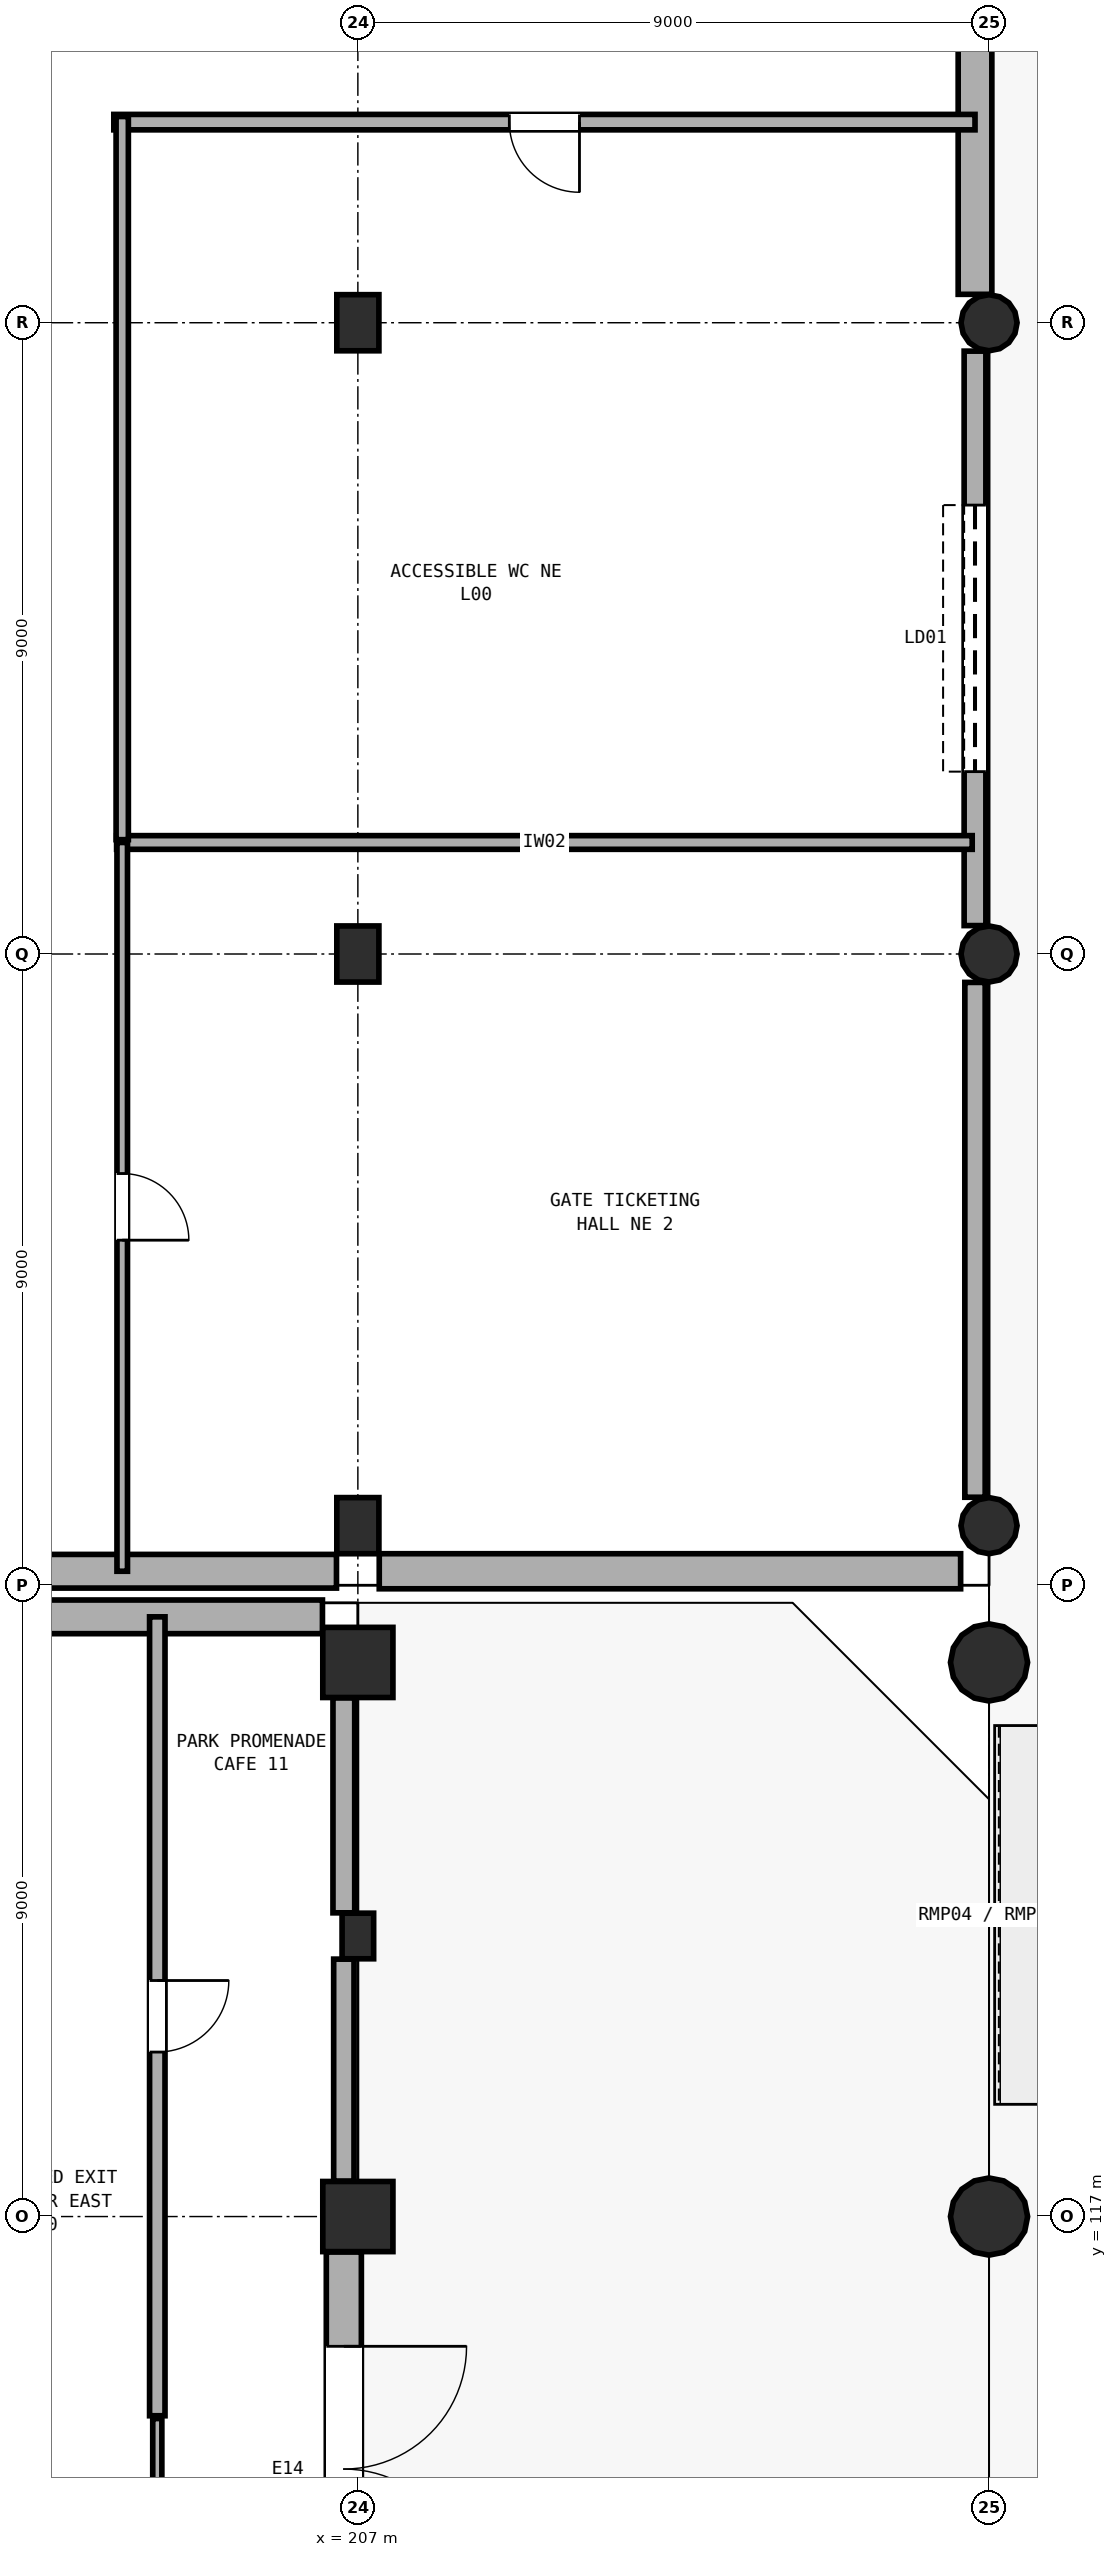
"""IFC4 building model, lengths in metres.
Left out: names, types, materials, properties, quantities, classifications, styles, units other than length and angle.
Written with IfcOpenShell. Run it as: python <this file> out.ifc"""

import sys

from ifc_helpers import new_model, si_unit, direction, frame, frame_2d, origin, origin_2d, place, context, subcontext, project, spatial, rectangle, circle, extrude, element, fill, save


model = new_model("IFC4")
c1 = context("Model", 3, precision=1e-05, world=origin(), true_north=direction((0.0, 1.0)))
c2 = subcontext(c1, "Body", "Model", "MODEL_VIEW")
j1 = project(units=[si_unit("LENGTHUNIT", "METRE"), si_unit("PLANEANGLEUNIT", "RADIAN")], contexts=[c1])
p1 = place(None, origin())
s1 = spatial("IfcSite", under=j1, at=p1, CompositionType="ELEMENT")
p2 = place(p1, origin())
s2 = spatial("IfcBuilding", under=s1, at=p2, CompositionType="ELEMENT")
p3 = place(p2, origin())
s3 = spatial("IfcBuildingStorey", under=s2, at=p3, CompositionType="ELEMENT", Elevation=0.0)
for number, where, z_axis, x_axis in (
    (1, (207.0, 117.0, 0.0), (0.0, 0.0, 1.0), (1.0, 0.0, 0.0)),
    (2, (207.0, 124.9, 0.0), (0.0, 0.0, 1.0), (1.0, 0.0, 0.0)),
):
    element("IfcColumn", number, at=place(p3, frame(where, z_axis=z_axis, x_axis=x_axis)), inside=s3, PredefinedType="COLUMN", context=c2, shape_type="SweptSolid", body=[
        extrude(rectangle(XDim=1.0, YDim=1.0, at=origin_2d()), origin(), (0.0, 0.0, 1.0), 4.8),
    ])
for number, where, z_axis, x_axis in (
    (3, (216.0, 117.0, 0.0), (0.0, 0.0, 1.0), (1.0, 0.0, 0.0)),
    (4, (216.0, 124.9, 0.0), (0.0, 0.0, 1.0), (1.0, 0.0, 0.0)),
):
    element("IfcColumn", number, at=place(p3, frame(where, z_axis=z_axis, x_axis=x_axis)), inside=s3, PredefinedType="COLUMN", context=c2, shape_type="SweptSolid", body=[
        extrude(circle(Radius=0.55, at=origin_2d()), origin(), (0.0, 0.0, 1.0), 4.8),
    ])
for number, where, z_axis, x_axis in (
    (5, (207.0, 126.85, 0.0), (0.0, 0.0, 1.0), (1.0, 0.0, 0.0)),
    (6, (207.0, 135.0, 0.0), (0.0, 0.0, 1.0), (1.0, 0.0, 0.0)),
    (7, (207.0, 144.0, 0.0), (0.0, 0.0, 1.0), (1.0, 0.0, 0.0)),
):
    element("IfcColumn", number, at=place(p3, frame(where, z_axis=z_axis, x_axis=x_axis)), inside=s3, PredefinedType="COLUMN", context=c2, shape_type="SweptSolid", body=[
        extrude(rectangle(XDim=0.6, YDim=0.8, at=origin_2d()), origin(), (0.0, 0.0, 1.0), 4.8),
    ])
for number, where, z_axis, x_axis in (
    (8, (216.0, 126.85, 0.0), (0.0, 0.0, 1.0), (1.0, 0.0, 0.0)),
    (9, (216.0, 135.0, 0.0), (0.0, 0.0, 1.0), (1.0, 0.0, 0.0)),
    (10, (216.0, 144.0, 0.0), (0.0, 0.0, 1.0), (1.0, 0.0, 0.0)),
):
    element("IfcColumn", number, at=place(p3, frame(where, z_axis=z_axis, x_axis=x_axis)), inside=s3, PredefinedType="COLUMN", context=c2, shape_type="SweptSolid", body=[
        extrude(circle(Radius=0.4, at=origin_2d()), origin(), (0.0, 0.0, 1.0), 4.8),
    ])
p4 = place(p3, frame((207.0, 121.0, 0.0), z_axis=(0.0, 0.0, 1.0), x_axis=(1.0, 0.0, 0.0)))
e11 = element("IfcColumn", 11, at=p4, inside=s3, PredefinedType="PILASTER", context=c2, shape_type="SweptSolid", body=[
    extrude(rectangle(XDim=0.45, YDim=0.65, at=origin_2d()), origin(), (0.0, 0.0, 1.0), 4.8),
])
p5 = place(p3, frame((198.555, 125.55, 0.0), z_axis=(0.0, 0.0, 1.0), x_axis=(1.0, 0.0, 0.0)))
e12 = element("IfcWall", 12, at=p5, inside=s3, PredefinedType="SOLIDWALL", context=c2, shape_type="SweptSolid", body=[
    extrude(rectangle(XDim=7.94, YDim=0.48, at=frame_2d((3.97, 0.0))), origin(), (0.0, 0.0, 1.0), 3.28),
])
p6 = place(p3, frame((206.8, 124.395, 0.0), z_axis=(0.0, 0.0, 1.0), x_axis=(0.0, -1.0, 0.0)))
e13 = element("IfcWall", 13, at=p6, inside=s3, PredefinedType="SOLIDWALL", context=c2, shape_type="SweptSolid", body=[
    extrude(rectangle(XDim=3.065, YDim=0.31, at=frame_2d((1.532, 0.0))), origin(), (0.0, 0.0, 1.0), 3.28),
])
p7 = place(p3, frame((206.8, 120.67, 0.0), z_axis=(0.0, 0.0, 1.0), x_axis=(0.0, -1.0, 0.0)))
e14 = element("IfcWall", 14, at=p7, inside=s3, PredefinedType="SOLIDWALL", context=c2, shape_type="SweptSolid", body=[
    extrude(rectangle(XDim=3.165, YDim=0.29, at=frame_2d((1.583, 0.0))), origin(), (0.0, 0.0, 1.0), 3.28),
])
p8 = place(p3, frame((206.8, 116.495, 0.0), z_axis=(0.0, 0.0, 1.0), x_axis=(0.0, -1.0, 0.0)))
e15 = element("IfcWall", 15, at=p8, inside=s3, PredefinedType="SOLIDWALL", context=c2, shape_type="SweptSolid", body=[
    extrude(rectangle(XDim=6.19, YDim=0.5, at=frame_2d((3.095, 0.0))), origin(), (0.0, 0.0, 1.0), 3.58),
])
p9 = place(p8, frame((1.345, 0.0, 0.0)))
e16 = element("IfcOpeningElement", 16, at=p9, cuts=e15, PredefinedType="OPENING", context=c2, shape_type="SweptSolid", body=[
    extrude(rectangle(XDim=3.5, YDim=2.6, at=frame_2d((1.75, 1.3))), frame((0.0, 0.26, 0.0), z_axis=(0.0, -1.0, 0.0), x_axis=(1.0, 0.0, 0.0)), (0.0, 0.0, 1.0), 0.52),
])
p10 = place(p3, frame((215.8, 152.595, 0.0), z_axis=(0.0, 0.0, 1.0), x_axis=(0.0, -1.0, 0.0)))
e17 = element("IfcWall", 17, at=p10, inside=s3, PredefinedType="SOLIDWALL", context=c2, shape_type="SweptSolid", body=[
    extrude(rectangle(XDim=8.19, YDim=0.48, at=frame_2d((4.095, 0.0))), origin(), (0.0, 0.0, 1.0), 3.58),
])
p11 = place(p3, frame((215.8, 143.595, 0.0), z_axis=(0.0, 0.0, 1.0), x_axis=(0.0, -1.0, 0.0)))
e18 = element("IfcWall", 18, at=p11, inside=s3, PredefinedType="SOLIDWALL", context=c2, shape_type="SweptSolid", body=[
    extrude(rectangle(XDim=8.19, YDim=0.31, at=frame_2d((4.095, 0.0))), origin(), (0.0, 0.0, 1.0), 3.58),
])
p12 = place(p11, frame((2.195, 0.0, 0.0)))
e19 = element("IfcOpeningElement", 19, at=p12, cuts=e18, PredefinedType="OPENING", context=c2, shape_type="SweptSolid", body=[
    extrude(rectangle(XDim=3.8, YDim=3.05, at=frame_2d((1.9, 1.525))), frame((0.0, 0.165, 0.0), z_axis=(0.0, -1.0, 0.0), x_axis=(1.0, 0.0, 0.0)), (0.0, 0.0, 1.0), 0.33),
])
p13 = place(p3, frame((215.8, 134.595, 0.0), z_axis=(0.0, 0.0, 1.0), x_axis=(0.0, -1.0, 0.0)))
e20 = element("IfcWall", 20, at=p13, inside=s3, PredefinedType="SOLIDWALL", context=c2, shape_type="SweptSolid", body=[
    extrude(rectangle(XDim=7.34, YDim=0.29, at=frame_2d((3.67, 0.0))), origin(), (0.0, 0.0, 1.0), 3.28),
])
p14 = place(p3, frame((215.595, 126.2, 0.0), z_axis=(0.0, 0.0, 1.0), x_axis=(-1.0, 0.0, 0.0)))
e21 = element("IfcWall", 21, at=p14, inside=s3, PredefinedType="SOLIDWALL", context=c2, shape_type="SweptSolid", body=[
    extrude(rectangle(XDim=8.29, YDim=0.5, at=frame_2d((4.145, 0.0))), origin(), (0.0, 0.0, 1.0), 3.28),
])
p15 = place(p3, frame((206.695, 126.2, 0.0), z_axis=(0.0, 0.0, 1.0), x_axis=(-1.0, 0.0, 0.0)))
e22 = element("IfcWall", 22, at=p15, inside=s3, PredefinedType="SOLIDWALL", context=c2, shape_type="SweptSolid", body=[
    extrude(rectangle(XDim=8.39, YDim=0.48, at=frame_2d((4.195, 0.0))), origin(), (0.0, 0.0, 1.0), 3.28),
])
p16 = place(p3, frame((204.14, 125.55, 0.0), z_axis=(0.0, 0.0, 1.0), x_axis=(0.0, -1.0, 0.0)))
e23 = element("IfcWall", 23, at=p16, inside=s3, PredefinedType="PARTITIONING", context=c2, shape_type="SweptSolid", body=[
    extrude(rectangle(XDim=11.39, YDim=0.22, at=frame_2d((5.695, 0.0))), origin(), (0.0, 0.0, 1.0), 3.28),
])
p17 = place(p16, frame((5.185, 0.0, 0.0)))
e24 = element("IfcOpeningElement", 24, at=p17, cuts=e23, PredefinedType="OPENING", context=c2, shape_type="SweptSolid", body=[
    extrude(rectangle(XDim=1.02, YDim=2.16, at=frame_2d((0.51, 1.08))), frame((0.0, 0.12, 0.0), z_axis=(0.0, -1.0, 0.0), x_axis=(1.0, 0.0, 0.0)), (0.0, 0.0, 1.0), 0.24),
])
p18 = place(p3, frame((204.14, 102.81, 0.0), z_axis=(0.0, 0.0, 1.0), x_axis=(0.0, 1.0, 0.0)))
e25 = element("IfcWall", 25, at=p18, inside=s3, PredefinedType="PARTITIONING", context=c2, shape_type="SweptSolid", body=[
    extrude(rectangle(XDim=11.31, YDim=0.13, at=frame_2d((5.655, 0.0))), origin(), (0.0, 0.0, 1.0), 3.28),
])
p19 = place(p3, frame((215.8, 146.86, 0.0), z_axis=(0.0, 0.0, 1.0), x_axis=(-1.0, 0.0, 0.0)))
e26 = element("IfcWall", 26, at=p19, inside=s3, PredefinedType="PARTITIONING", context=c2, shape_type="SweptSolid", body=[
    extrude(rectangle(XDim=12.28, YDim=0.22, at=frame_2d((6.14, 0.0))), origin(), (0.0, 0.0, 1.0), 3.28),
])
p20 = place(p19, frame((5.64, 0.0, 0.0)))
e27 = element("IfcOpeningElement", 27, at=p20, cuts=e26, PredefinedType="OPENING", context=c2, shape_type="SweptSolid", body=[
    extrude(rectangle(XDim=1.0, YDim=2.1, at=frame_2d((0.5, 1.05))), frame((0.0, 0.12, 0.0), z_axis=(0.0, -1.0, 0.0), x_axis=(1.0, 0.0, 0.0)), (0.0, 0.0, 1.0), 0.24),
])
p21 = place(p3, frame((215.76, 136.59, 0.0), z_axis=(0.0, 0.0, 1.0), x_axis=(-1.0, 0.0, 0.0)))
e28 = element("IfcWall", 28, at=p21, inside=s3, PredefinedType="PARTITIONING", context=c2, shape_type="SweptSolid", body=[
    extrude(rectangle(XDim=12.2, YDim=0.195, at=frame_2d((6.1, 0.0))), origin(), (0.0, 0.0, 1.0), 3.28),
])
p22 = place(p3, frame((203.64, 136.63, 0.0), z_axis=(0.0, 0.0, 1.0), x_axis=(0.0, 1.0, 0.0)))
e29 = element("IfcWall", 29, at=p22, inside=s3, PredefinedType="PARTITIONING", context=c2, shape_type="SweptSolid", body=[
    extrude(rectangle(XDim=10.31, YDim=0.175, at=frame_2d((5.155, 0.0))), origin(), (0.0, 0.0, 1.0), 3.28),
])
p23 = place(p3, frame((203.64, 136.59, 0.0), z_axis=(0.0, 0.0, 1.0), x_axis=(0.0, -1.0, 0.0)))
e30 = element("IfcWall", 30, at=p23, inside=s3, PredefinedType="PARTITIONING", context=c2, shape_type="SweptSolid", body=[
    extrude(rectangle(XDim=10.39, YDim=0.15, at=frame_2d((5.195, 0.0))), origin(), (0.0, 0.0, 1.0), 3.28),
])
p24 = place(p23, frame((4.72, 0.0, 0.0)))
e31 = element("IfcOpeningElement", 31, at=p24, cuts=e30, PredefinedType="OPENING", context=c2, shape_type="SweptSolid", body=[
    extrude(rectangle(XDim=0.95, YDim=2.1, at=frame_2d((0.475, 1.05))), frame((0.0, 0.085, 0.0), z_axis=(0.0, -1.0, 0.0), x_axis=(1.0, 0.0, 0.0)), (0.0, 0.0, 1.0), 0.17),
])
p25 = place(p9, origin())
e32 = element("IfcDoor", 32, at=p25, inside=s3, OperationType="DOUBLE_DOOR_SINGLE_SWING", PredefinedType="DOOR", context=c2, shape_type="SweptSolid", body=[
    extrude(rectangle(XDim=3.5, YDim=2.6, at=frame_2d((1.75, 1.3))), frame((0.0, 0.025, 0.0), z_axis=(0.0, -1.0, 0.0), x_axis=(1.0, 0.0, 0.0)), (0.0, 0.0, 1.0), 0.05),
])
fill(e16, e32)
p26 = place(p12, origin())
e33 = element("IfcDoor", 33, at=p26, inside=s3, OperationType="ROLLINGUP", PredefinedType="DOOR", context=c2, shape_type="SweptSolid", body=[
    extrude(rectangle(XDim=3.8, YDim=3.05, at=frame_2d((1.9, 1.525))), frame((0.0, 0.025, 0.0), z_axis=(0.0, -1.0, 0.0), x_axis=(1.0, 0.0, 0.0)), (0.0, 0.0, 1.0), 0.05),
])
fill(e19, e33)
p27 = place(p17, origin())
e34 = element("IfcDoor", 34, at=p27, inside=s3, OperationType="SINGLE_SWING_LEFT", PredefinedType="DOOR", context=c2, shape_type="SweptSolid", body=[
    extrude(rectangle(XDim=1.02, YDim=2.16, at=frame_2d((0.51, 1.08))), frame((0.0, 0.025, 0.0), z_axis=(0.0, -1.0, 0.0), x_axis=(1.0, 0.0, 0.0)), (0.0, 0.0, 1.0), 0.05),
])
fill(e24, e34)
p28 = place(p20, origin())
e35 = element("IfcDoor", 35, at=p28, inside=s3, OperationType="SINGLE_SWING_LEFT", PredefinedType="DOOR", context=c2, shape_type="SweptSolid", body=[
    extrude(rectangle(XDim=1.0, YDim=2.1, at=frame_2d((0.5, 1.05))), frame((0.0, 0.025, 0.0), z_axis=(0.0, -1.0, 0.0), x_axis=(1.0, 0.0, 0.0)), (0.0, 0.0, 1.0), 0.05),
])
fill(e27, e35)
p29 = place(p24, origin())
e36 = element("IfcDoor", 36, at=p29, inside=s3, OperationType="SINGLE_SWING_RIGHT", PredefinedType="DOOR", context=c2, shape_type="SweptSolid", body=[
    extrude(rectangle(XDim=0.95, YDim=2.1, at=frame_2d((0.475, 1.05))), frame((0.0, 0.025, 0.0), z_axis=(0.0, -1.0, 0.0), x_axis=(1.0, 0.0, 0.0)), (0.0, 0.0, 1.0), 0.05),
])
fill(e31, e36)
save(model, sys.argv[1])
